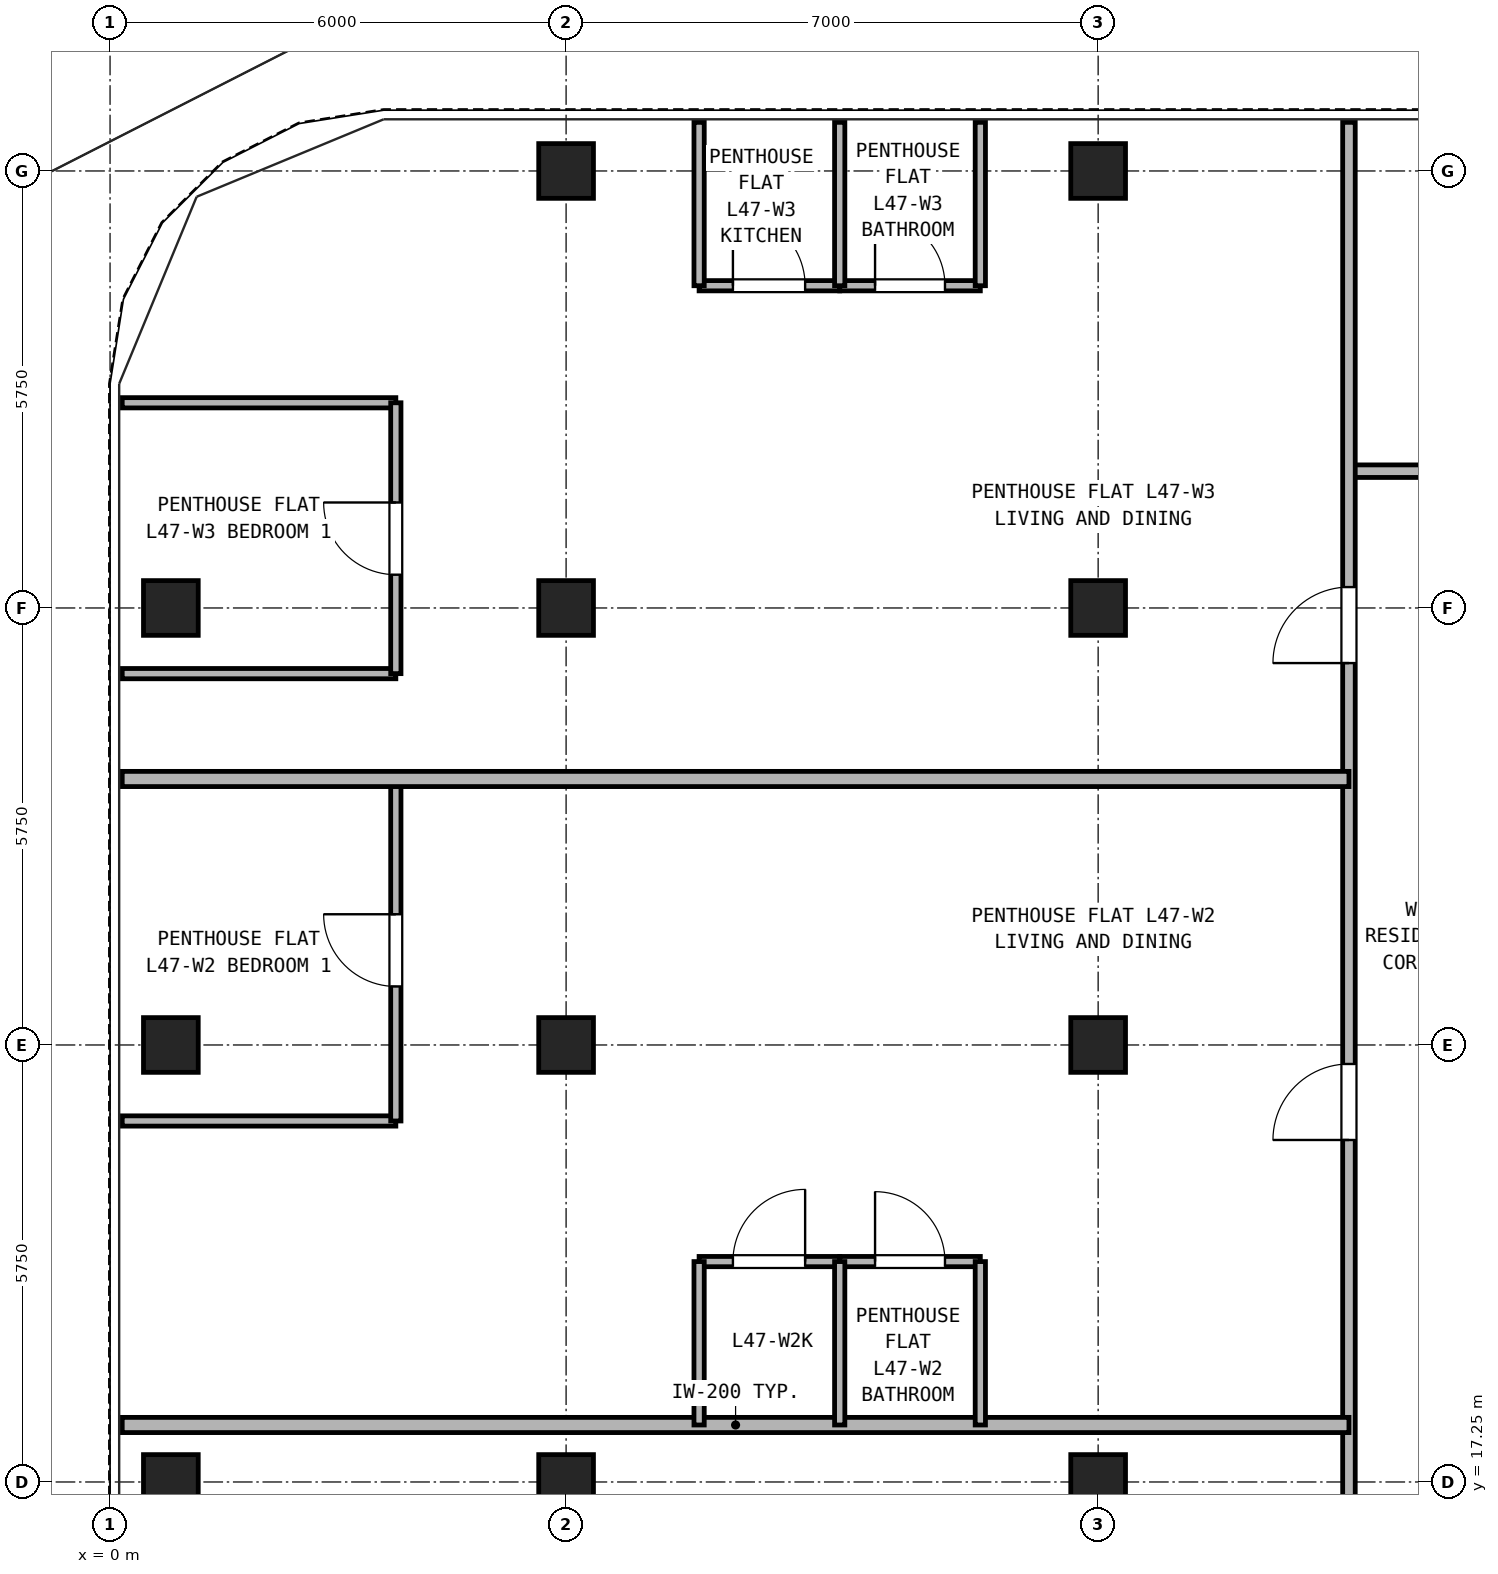
"""IFC4 building model, lengths in metres.
Left out: names, types, materials, properties, quantities, classifications, styles, units other than length and angle.
Written with IfcOpenShell. Run it as: python <this file> out.ifc"""

import sys

from ifc_helpers import new_model, si_unit, direction, frame, frame_2d, origin, origin_2d, place, context, subcontext, project, spatial, rectangle, hollow_rectangle, extrude, source, transform, mapped, element, fill, save


model = new_model("IFC4")
c1 = context("Model", 3, precision=1e-05, world=origin(), true_north=direction((0.0, 1.0)))
c2 = subcontext(c1, "Body", "Model", "MODEL_VIEW")
j1 = project(units=[si_unit("LENGTHUNIT", "METRE"), si_unit("PLANEANGLEUNIT", "RADIAN")], contexts=[c1])
p1 = place(None, origin())
s1 = spatial("IfcSite", under=j1, at=p1, CompositionType="ELEMENT")
p2 = place(p1, origin())
s2 = spatial("IfcBuilding", under=s1, at=p2, CompositionType="ELEMENT")
p3 = place(p2, frame((0.0, 0.0, 168.9)))
s3 = spatial("IfcBuildingStorey", under=s2, at=p3, CompositionType="ELEMENT", Elevation=168.9)
m1 = source(origin(), c2, "Body", "SweptSolid", [
    extrude(hollow_rectangle(XDim=0.72, YDim=0.72, WallThickness=0.04, at=origin_2d()), origin(), (0.0, 0.0, 1.0), 2.95),
])
for number, where, z_axis, x_axis in (
    (1, (6.0, 34.5, 0.0), (0.0, 0.0, 1.0), (1.0, 0.0, 0.0)),
    (2, (13.0, 34.5, 0.0), (0.0, 0.0, 1.0), (1.0, 0.0, 0.0)),
    (3, (0.8, 17.25, 0.0), (0.0, 0.0, 1.0), (1.0, 0.0, 0.0)),
    (4, (0.8, 23.0, 0.0), (0.0, 0.0, 1.0), (1.0, 0.0, 0.0)),
    (5, (0.8, 28.75, 0.0), (0.0, 0.0, 1.0), (1.0, 0.0, 0.0)),
    (6, (6.0, 17.25, 0.0), (0.0, 0.0, 1.0), (1.0, 0.0, 0.0)),
    (7, (6.0, 23.0, 0.0), (0.0, 0.0, 1.0), (1.0, 0.0, 0.0)),
    (8, (6.0, 28.75, 0.0), (0.0, 0.0, 1.0), (1.0, 0.0, 0.0)),
    (9, (13.0, 17.25, 0.0), (0.0, 0.0, 1.0), (1.0, 0.0, 0.0)),
    (10, (13.0, 23.0, 0.0), (0.0, 0.0, 1.0), (1.0, 0.0, 0.0)),
    (11, (13.0, 28.75, 0.0), (0.0, 0.0, 1.0), (1.0, 0.0, 0.0)),
):
    element("IfcColumn", number, at=place(p3, frame(where, z_axis=z_axis, x_axis=x_axis)), inside=s3, PredefinedType="COLUMN", context=c2, shape_type="MappedRepresentation", body=[
        mapped(m1, transform((0.0, 0.0, 0.0), x_axis=(1.0, 0.0, 0.0), y_axis=(0.0, 1.0, 0.0), z_axis=(0.0, 0.0, 1.0), scale=1.0)),
    ])
p4 = place(p3, frame((16.3, 30.55, 0.0), z_axis=(0.0, 0.0, 1.0), x_axis=(1.0, 0.0, 0.0)))
e12 = element("IfcWall", 12, at=p4, inside=s3, PredefinedType="PARTITIONING", context=c2, shape_type="SweptSolid", body=[
    extrude(rectangle(XDim=14.4, YDim=0.165, at=frame_2d((7.2, 0.0))), origin(), (0.0, 0.0, 1.0), 2.95),
])
p5 = place(p4, frame((2.1, 0.0, 0.0)))
e13 = element("IfcOpeningElement", 13, at=p5, cuts=e12, PredefinedType="OPENING", context=c2, shape_type="SweptSolid", body=[
    extrude(rectangle(XDim=0.95, YDim=2.15, at=frame_2d((0.475, 1.075))), frame((0.0, 0.093, 0.0), z_axis=(0.0, -1.0, 0.0), x_axis=(1.0, 0.0, 0.0)), (0.0, 0.0, 1.0), 0.185),
])
p6 = place(p4, frame((6.9, 0.0, 0.0)))
e14 = element("IfcOpeningElement", 14, at=p6, cuts=e12, PredefinedType="OPENING", context=c2, shape_type="SweptSolid", body=[
    extrude(rectangle(XDim=0.95, YDim=2.15, at=frame_2d((0.475, 1.075))), frame((0.0, 0.093, 0.0), z_axis=(0.0, -1.0, 0.0), x_axis=(1.0, 0.0, 0.0)), (0.0, 0.0, 1.0), 0.185),
])
p7 = place(p4, frame((11.5, 0.0, 0.0)))
e15 = element("IfcOpeningElement", 15, at=p7, cuts=e12, PredefinedType="OPENING", context=c2, shape_type="SweptSolid", body=[
    extrude(rectangle(XDim=0.92, YDim=2.1, at=frame_2d((0.46, 1.05))), frame((0.0, 0.093, 0.0), z_axis=(0.0, -1.0, 0.0), x_axis=(1.0, 0.0, 0.0)), (0.0, 0.0, 1.0), 0.185),
])
p8 = place(p3, frame((16.3, 11.45, 0.0), z_axis=(0.0, 0.0, 1.0), x_axis=(0.0, 1.0, 0.0)))
e16 = element("IfcWall", 16, at=p8, inside=s3, PredefinedType="PARTITIONING", context=c2, shape_type="SweptSolid", body=[
    extrude(rectangle(XDim=23.69, YDim=0.165, at=frame_2d((11.845, 0.0))), origin(), (0.0, 0.0, 1.0), 2.95),
])
p9 = place(p8, frame((2.775, 0.0, 0.0)))
e17 = element("IfcOpeningElement", 17, at=p9, cuts=e16, PredefinedType="OPENING", context=c2, shape_type="SweptSolid", body=[
    extrude(rectangle(XDim=1.0, YDim=2.15, at=frame_2d((0.5, 1.075))), frame((0.0, 0.093, 0.0), z_axis=(0.0, -1.0, 0.0), x_axis=(1.0, 0.0, 0.0)), (0.0, 0.0, 1.0), 0.185),
])
p10 = place(p8, frame((10.3, 0.0, 0.0)))
e18 = element("IfcOpeningElement", 18, at=p10, cuts=e16, PredefinedType="OPENING", context=c2, shape_type="SweptSolid", body=[
    extrude(rectangle(XDim=1.0, YDim=2.15, at=frame_2d((0.5, 1.075))), frame((0.0, 0.093, 0.0), z_axis=(0.0, -1.0, 0.0), x_axis=(1.0, 0.0, 0.0)), (0.0, 0.0, 1.0), 0.185),
])
p11 = place(p8, frame((16.575, 0.0, 0.0)))
e19 = element("IfcOpeningElement", 19, at=p11, cuts=e16, PredefinedType="OPENING", context=c2, shape_type="SweptSolid", body=[
    extrude(rectangle(XDim=1.0, YDim=2.15, at=frame_2d((0.5, 1.075))), frame((0.0, 0.093, 0.0), z_axis=(0.0, -1.0, 0.0), x_axis=(1.0, 0.0, 0.0)), (0.0, 0.0, 1.0), 0.185),
])
p12 = place(p3, frame((0.16, 18.0, 0.0), z_axis=(0.0, 0.0, 1.0), x_axis=(1.0, 0.0, 0.0)))
e20 = element("IfcWall", 20, at=p12, inside=s3, PredefinedType="PARTITIONING", context=c2, shape_type="SweptSolid", body=[
    extrude(rectangle(XDim=16.14, YDim=0.2, at=frame_2d((8.07, 0.0))), origin(), (0.0, 0.0, 1.0), 2.95),
])
p13 = place(p3, frame((7.75, 20.15, 0.0), z_axis=(0.0, 0.0, 1.0), x_axis=(1.0, 0.0, 0.0)))
e21 = element("IfcWall", 21, at=p13, inside=s3, PredefinedType="PARTITIONING", context=c2, shape_type="SweptSolid", body=[
    extrude(rectangle(XDim=1.85, YDim=0.135, at=frame_2d((0.925, 0.0))), origin(), (0.0, 0.0, 1.0), 2.583),
])
p14 = place(p13, frame((0.445, 0.0, 0.0)))
e22 = element("IfcOpeningElement", 22, at=p14, cuts=e21, PredefinedType="OPENING", context=c2, shape_type="SweptSolid", body=[
    extrude(rectangle(XDim=0.95, YDim=2.15, at=frame_2d((0.475, 1.075))), frame((0.0, 0.077, 0.0), z_axis=(0.0, -1.0, 0.0), x_axis=(1.0, 0.0, 0.0)), (0.0, 0.0, 1.0), 0.155),
])
p15 = place(p3, frame((9.6, 20.15, 0.0), z_axis=(0.0, 0.0, 1.0), x_axis=(1.0, 0.0, 0.0)))
e23 = element("IfcWall", 23, at=p15, inside=s3, PredefinedType="PARTITIONING", context=c2, shape_type="SweptSolid", body=[
    extrude(rectangle(XDim=1.85, YDim=0.135, at=frame_2d((0.925, 0.0))), origin(), (0.0, 0.0, 1.0), 2.583),
])
p16 = place(p15, frame((0.465, 0.0, 0.0)))
e24 = element("IfcOpeningElement", 24, at=p16, cuts=e23, PredefinedType="OPENING", context=c2, shape_type="SweptSolid", body=[
    extrude(rectangle(XDim=0.92, YDim=2.1, at=frame_2d((0.46, 1.05))), frame((0.0, 0.077, 0.0), z_axis=(0.0, -1.0, 0.0), x_axis=(1.0, 0.0, 0.0)), (0.0, 0.0, 1.0), 0.155),
])
for number, where, z_axis, x_axis in (
    (25, (7.75, 18.0, 0.0), (0.0, 0.0, 1.0), (0.0, 1.0, 0.0)),
    (26, (9.6, 18.0, 0.0), (0.0, 0.0, 1.0), (0.0, 1.0, 0.0)),
    (27, (11.45, 18.0, 0.0), (0.0, 0.0, 1.0), (0.0, 1.0, 0.0)),
):
    element("IfcWall", number, at=place(p3, frame(where, z_axis=z_axis, x_axis=x_axis)), inside=s3, PredefinedType="PARTITIONING", context=c2, shape_type="SweptSolid", body=[
        extrude(rectangle(XDim=2.15, YDim=0.135, at=frame_2d((1.075, 0.0))), origin(), (0.0, 0.0, 1.0), 2.95),
    ])
p17 = place(p3, frame((0.16, 22.0, 0.0), z_axis=(0.0, 0.0, 1.0), x_axis=(1.0, 0.0, 0.0)))
e28 = element("IfcWall", 28, at=p17, inside=s3, PredefinedType="PARTITIONING", context=c2, shape_type="SweptSolid", body=[
    extrude(rectangle(XDim=3.6, YDim=0.135, at=frame_2d((1.8, 0.0))), origin(), (0.0, 0.0, 1.0), 2.95),
])
p18 = place(p3, frame((3.76, 22.0, 0.0), z_axis=(0.0, 0.0, 1.0), x_axis=(0.0, 1.0, 0.0)))
e29 = element("IfcWall", 29, at=p18, inside=s3, PredefinedType="PARTITIONING", context=c2, shape_type="SweptSolid", body=[
    extrude(rectangle(XDim=4.5, YDim=0.135, at=frame_2d((2.25, 0.0))), origin(), (0.0, 0.0, 1.0), 2.95),
])
p19 = place(p18, frame((1.77, 0.0, 0.0)))
e30 = element("IfcOpeningElement", 30, at=p19, cuts=e29, PredefinedType="OPENING", context=c2, shape_type="SweptSolid", body=[
    extrude(rectangle(XDim=0.95, YDim=2.15, at=frame_2d((0.475, 1.075))), frame((0.0, 0.077, 0.0), z_axis=(0.0, -1.0, 0.0), x_axis=(1.0, 0.0, 0.0)), (0.0, 0.0, 1.0), 0.155),
])
p20 = place(p3, frame((0.16, 26.5, 0.0), z_axis=(0.0, 0.0, 1.0), x_axis=(1.0, 0.0, 0.0)))
e31 = element("IfcWall", 31, at=p20, inside=s3, PredefinedType="PARTITIONING", context=c2, shape_type="SweptSolid", body=[
    extrude(rectangle(XDim=16.14, YDim=0.2, at=frame_2d((8.07, 0.0))), origin(), (0.0, 0.0, 1.0), 2.95),
])
p21 = place(p3, frame((7.75, 32.99, 0.0), z_axis=(0.0, 0.0, 1.0), x_axis=(1.0, 0.0, 0.0)))
e32 = element("IfcWall", 32, at=p21, inside=s3, PredefinedType="PARTITIONING", context=c2, shape_type="SweptSolid", body=[
    extrude(rectangle(XDim=1.85, YDim=0.135, at=frame_2d((0.925, 0.0))), origin(), (0.0, 0.0, 1.0), 2.95),
])
p22 = place(p21, frame((0.445, 0.0, 0.0)))
e33 = element("IfcOpeningElement", 33, at=p22, cuts=e32, PredefinedType="OPENING", context=c2, shape_type="SweptSolid", body=[
    extrude(rectangle(XDim=0.95, YDim=2.15, at=frame_2d((0.475, 1.075))), frame((0.0, 0.077, 0.0), z_axis=(0.0, -1.0, 0.0), x_axis=(1.0, 0.0, 0.0)), (0.0, 0.0, 1.0), 0.155),
])
p23 = place(p3, frame((9.6, 32.99, 0.0), z_axis=(0.0, 0.0, 1.0), x_axis=(1.0, 0.0, 0.0)))
e34 = element("IfcWall", 34, at=p23, inside=s3, PredefinedType="PARTITIONING", context=c2, shape_type="SweptSolid", body=[
    extrude(rectangle(XDim=1.85, YDim=0.135, at=frame_2d((0.925, 0.0))), origin(), (0.0, 0.0, 1.0), 2.95),
])
p24 = place(p23, frame((0.465, 0.0, 0.0)))
e35 = element("IfcOpeningElement", 35, at=p24, cuts=e34, PredefinedType="OPENING", context=c2, shape_type="SweptSolid", body=[
    extrude(rectangle(XDim=0.92, YDim=2.1, at=frame_2d((0.46, 1.05))), frame((0.0, 0.077, 0.0), z_axis=(0.0, -1.0, 0.0), x_axis=(1.0, 0.0, 0.0)), (0.0, 0.0, 1.0), 0.155),
])
for number, where, z_axis, x_axis in (
    (36, (7.75, 32.99, 0.0), (0.0, 0.0, 1.0), (0.0, 1.0, 0.0)),
    (37, (9.6, 32.99, 0.0), (0.0, 0.0, 1.0), (0.0, 1.0, 0.0)),
    (38, (11.45, 32.99, 0.0), (0.0, 0.0, 1.0), (0.0, 1.0, 0.0)),
):
    element("IfcWall", number, at=place(p3, frame(where, z_axis=z_axis, x_axis=x_axis)), inside=s3, PredefinedType="PARTITIONING", context=c2, shape_type="SweptSolid", body=[
        extrude(rectangle(XDim=2.15, YDim=0.135, at=frame_2d((1.075, 0.0))), origin(), (0.0, 0.0, 1.0), 2.95),
    ])
for number, where, z_axis, x_axis in (
    (39, (0.16, 27.886, 0.0), (0.0, 0.0, 1.0), (1.0, 0.0, 0.0)),
    (40, (0.16, 31.45, 0.0), (0.0, 0.0, 1.0), (1.0, 0.0, 0.0)),
):
    element("IfcWall", number, at=place(p3, frame(where, z_axis=z_axis, x_axis=x_axis)), inside=s3, PredefinedType="PARTITIONING", context=c2, shape_type="SweptSolid", body=[
        extrude(rectangle(XDim=3.6, YDim=0.135, at=frame_2d((1.8, 0.0))), origin(), (0.0, 0.0, 1.0), 2.95),
    ])
p25 = place(p3, frame((3.76, 27.886, 0.0), z_axis=(0.0, 0.0, 1.0), x_axis=(0.0, 1.0, 0.0)))
e41 = element("IfcWall", 41, at=p25, inside=s3, PredefinedType="PARTITIONING", context=c2, shape_type="SweptSolid", body=[
    extrude(rectangle(XDim=3.564, YDim=0.135, at=frame_2d((1.782, 0.0))), origin(), (0.0, 0.0, 1.0), 2.95),
])
p26 = place(p25, frame((1.302, 0.0, 0.0)))
e42 = element("IfcOpeningElement", 42, at=p26, cuts=e41, PredefinedType="OPENING", context=c2, shape_type="SweptSolid", body=[
    extrude(rectangle(XDim=0.95, YDim=2.15, at=frame_2d((0.475, 1.075))), frame((0.0, 0.077, 0.0), z_axis=(0.0, -1.0, 0.0), x_axis=(1.0, 0.0, 0.0)), (0.0, 0.0, 1.0), 0.155),
])
p27 = place(p14, origin())
e43 = element("IfcDoor", 43, at=p27, inside=s3, OperationType="SINGLE_SWING_RIGHT", PredefinedType="DOOR", context=c2, shape_type="SweptSolid", body=[
    extrude(rectangle(XDim=0.95, YDim=2.15, at=frame_2d((0.475, 1.075))), frame((0.0, 0.025, 0.0), z_axis=(0.0, -1.0, 0.0), x_axis=(1.0, 0.0, 0.0)), (0.0, 0.0, 1.0), 0.05),
])
fill(e22, e43)
p28 = place(p16, origin())
e44 = element("IfcDoor", 44, at=p28, inside=s3, OperationType="SINGLE_SWING_LEFT", PredefinedType="DOOR", context=c2, shape_type="SweptSolid", body=[
    extrude(rectangle(XDim=0.92, YDim=2.1, at=frame_2d((0.46, 1.05))), frame((0.0, 0.025, 0.0), z_axis=(0.0, -1.0, 0.0), x_axis=(1.0, 0.0, 0.0)), (0.0, 0.0, 1.0), 0.05),
])
fill(e24, e44)
p29 = place(p19, origin())
e45 = element("IfcDoor", 45, at=p29, inside=s3, OperationType="SINGLE_SWING_RIGHT", PredefinedType="DOOR", context=c2, shape_type="SweptSolid", body=[
    extrude(rectangle(XDim=0.95, YDim=2.15, at=frame_2d((0.475, 1.075))), frame((0.0, 0.025, 0.0), z_axis=(0.0, -1.0, 0.0), x_axis=(1.0, 0.0, 0.0)), (0.0, 0.0, 1.0), 0.05),
])
fill(e30, e45)
p30 = place(p10, origin())
e46 = element("IfcDoor", 46, at=p30, inside=s3, OperationType="SINGLE_SWING_LEFT", PredefinedType="DOOR", context=c2, shape_type="SweptSolid", body=[
    extrude(rectangle(XDim=1.0, YDim=2.15, at=frame_2d((0.5, 1.075))), frame((0.0, 0.025, 0.0), z_axis=(0.0, -1.0, 0.0), x_axis=(1.0, 0.0, 0.0)), (0.0, 0.0, 1.0), 0.05),
])
fill(e18, e46)
p31 = place(p22, frame((0.95, 0.0, 0.0), z_axis=(0.0, 0.0, 1.0), x_axis=(-1.0, 0.0, 0.0)))
e47 = element("IfcDoor", 47, at=p31, inside=s3, OperationType="SINGLE_SWING_LEFT", PredefinedType="DOOR", context=c2, shape_type="SweptSolid", body=[
    extrude(rectangle(XDim=0.95, YDim=2.15, at=frame_2d((0.475, 1.075))), frame((0.0, 0.025, 0.0), z_axis=(0.0, -1.0, 0.0), x_axis=(1.0, 0.0, 0.0)), (0.0, 0.0, 1.0), 0.05),
])
fill(e33, e47)
p32 = place(p24, frame((0.92, 0.0, 0.0), z_axis=(0.0, 0.0, 1.0), x_axis=(-1.0, 0.0, 0.0)))
e48 = element("IfcDoor", 48, at=p32, inside=s3, OperationType="SINGLE_SWING_LEFT", PredefinedType="DOOR", context=c2, shape_type="SweptSolid", body=[
    extrude(rectangle(XDim=0.92, YDim=2.1, at=frame_2d((0.46, 1.05))), frame((0.0, 0.025, 0.0), z_axis=(0.0, -1.0, 0.0), x_axis=(1.0, 0.0, 0.0)), (0.0, 0.0, 1.0), 0.05),
])
fill(e35, e48)
p33 = place(p26, origin())
e49 = element("IfcDoor", 49, at=p33, inside=s3, OperationType="SINGLE_SWING_RIGHT", PredefinedType="DOOR", context=c2, shape_type="SweptSolid", body=[
    extrude(rectangle(XDim=0.95, YDim=2.15, at=frame_2d((0.475, 1.075))), frame((0.0, 0.025, 0.0), z_axis=(0.0, -1.0, 0.0), x_axis=(1.0, 0.0, 0.0)), (0.0, 0.0, 1.0), 0.05),
])
fill(e42, e49)
p34 = place(p11, origin())
e50 = element("IfcDoor", 50, at=p34, inside=s3, OperationType="SINGLE_SWING_LEFT", PredefinedType="DOOR", context=c2, shape_type="SweptSolid", body=[
    extrude(rectangle(XDim=1.0, YDim=2.15, at=frame_2d((0.5, 1.075))), frame((0.0, 0.025, 0.0), z_axis=(0.0, -1.0, 0.0), x_axis=(1.0, 0.0, 0.0)), (0.0, 0.0, 1.0), 0.05),
])
fill(e19, e50)
save(model, sys.argv[1])
